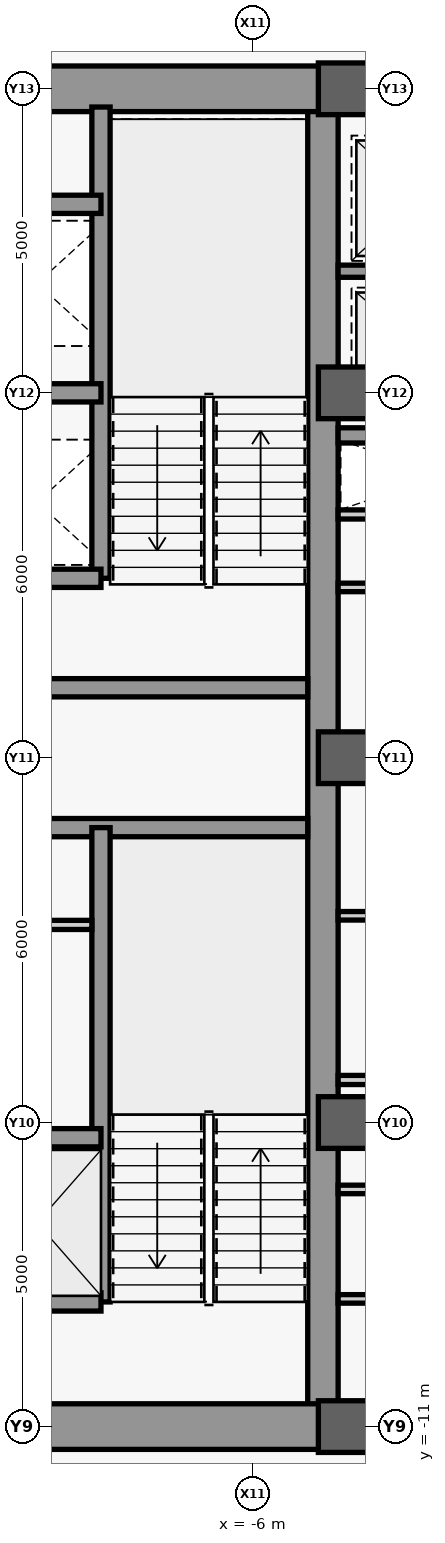
"""IFC4 building model, lengths in metres.
Left out: names, types, materials, properties, quantities, classifications, styles, units other than length and angle.
Written with IfcOpenShell. Run it as: python <this file> out.ifc"""

import sys

from ifc_helpers import new_model, si_unit, direction, frame, frame_2d, origin, origin_2d, place, context, subcontext, project, spatial, rectangle, extrude, source, transform, mapped, element, save


model = new_model("IFC4")
c1 = context("Model", 3, precision=1e-05, world=origin(), true_north=direction((0.0, 1.0)))
c2 = subcontext(c1, "Body", "Model", "MODEL_VIEW")
j1 = project(units=[si_unit("LENGTHUNIT", "METRE"), si_unit("PLANEANGLEUNIT", "RADIAN")], contexts=[c1])
p1 = place(None, origin())
s1 = spatial("IfcSite", under=j1, at=p1, CompositionType="ELEMENT")
p2 = place(p1, origin())
s2 = spatial("IfcBuilding", under=s1, at=p2, CompositionType="ELEMENT")
p3 = place(p2, frame((0.0, 0.0, 155.1)))
s3 = spatial("IfcBuildingStorey", under=s2, at=p3, CompositionType="ELEMENT", Elevation=155.1)
m1 = source(origin(), c2, "Body", "SweptSolid", [
    extrude(rectangle(XDim=21.4, YDim=0.5, at=frame_2d((10.7, 0.0))), origin(), (0.0, 0.0, 1.0), 3.78),
])
p4 = place(p3, frame((-4.85, -10.7, 0.0), z_axis=(0.0, 0.0, 1.0), x_axis=(0.0, 1.0, 0.0)))
e1 = element("IfcWall", 1, at=p4, inside=s3, PredefinedType="SHEAR", context=c2, shape_type="MappedRepresentation", body=[
    mapped(m1, transform((0.0, 0.0, 0.0), scale=1.0)),
])
m2 = source(origin(), c2, "Body", "SweptSolid", [
    extrude(rectangle(XDim=5.85, YDim=0.75, at=frame_2d((2.925, 0.0))), origin(), (0.0, 0.0, 1.0), 3.78),
])
for number, where, z_axis, x_axis in (
    (2, (-10.7, -11.0, 0.0), (0.0, 0.0, 1.0), (1.0, 0.0, 0.0)),
    (3, (-10.7, 11.0, 0.0), (0.0, 0.0, 1.0), (1.0, 0.0, 0.0)),
):
    element("IfcWall", number, at=place(p3, frame(where, z_axis=z_axis, x_axis=x_axis)), inside=s3, PredefinedType="SHEAR", context=c2, shape_type="MappedRepresentation", body=[
        mapped(m2, transform((0.0, 0.0, 0.0), scale=1.0)),
    ])
m3 = source(origin(), c2, "Body", "SweptSolid", [
    extrude(rectangle(XDim=5.6, YDim=0.3, at=frame_2d((2.8, 0.0))), origin(), (0.0, 0.0, 1.0), 3.78),
])
for number, where, z_axis, x_axis in (
    (4, (-10.7, -1.15, 0.0), (0.0, 0.0, 1.0), (1.0, 0.0, 0.0)),
    (5, (-10.7, 1.15, 0.0), (0.0, 0.0, 1.0), (1.0, 0.0, 0.0)),
):
    element("IfcWall", number, at=place(p3, frame(where, z_axis=z_axis, x_axis=x_axis)), inside=s3, PredefinedType="SHEAR", context=c2, shape_type="MappedRepresentation", body=[
        mapped(m3, transform((0.0, 0.0, 0.0), scale=1.0)),
    ])
m4 = source(origin(), c2, "Body", "SweptSolid", [
    extrude(rectangle(XDim=9.2, YDim=0.5, at=frame_2d((4.6, 0.0))), origin(), (0.0, 0.0, 1.0), 3.78),
])
p5 = place(p3, frame((-4.6, -11.0, 0.0), z_axis=(0.0, 0.0, 1.0), x_axis=(1.0, 0.0, 0.0)))
e6 = element("IfcWall", 6, at=p5, inside=s3, PredefinedType="SHEAR", context=c2, shape_type="MappedRepresentation", body=[
    mapped(m4, transform((0.0, 0.0, 0.0), scale=1.0)),
])
m5 = source(origin(), c2, "Body", "SweptSolid", [
    extrude(rectangle(XDim=1.8, YDim=2.25, at=frame_2d((0.9, 1.125))), frame((0.0, 0.26, 0.0), z_axis=(0.0, -1.0, 0.0), x_axis=(1.0, 0.0, 0.0)), (0.0, 0.0, 1.0), 0.52),
])
p6 = place(p5, frame((3.7, 0.0, 0.0)))
e7 = element("IfcOpeningElement", 7, at=p6, cuts=e6, PredefinedType="OPENING", context=c2, shape_type="MappedRepresentation", body=[
    mapped(m5, transform((0.0, 0.0, 0.0), scale=1.0)),
])
p7 = place(p3, frame((-4.6, 11.0, 0.0), z_axis=(0.0, 0.0, 1.0), x_axis=(1.0, 0.0, 0.0)))
e8 = element("IfcWall", 8, at=p7, inside=s3, PredefinedType="SHEAR", context=c2, shape_type="MappedRepresentation", body=[
    mapped(m4, transform((0.0, 0.0, 0.0), scale=1.0)),
])
p8 = place(p7, frame((3.7, 0.0, 0.0)))
e9 = element("IfcOpeningElement", 9, at=p8, cuts=e8, PredefinedType="OPENING", context=c2, shape_type="MappedRepresentation", body=[
    mapped(m5, transform((0.0, 0.0, 0.0), scale=1.0)),
])
m6 = source(origin(), c2, "Body", "SweptSolid", [
    extrude(rectangle(XDim=0.85, YDim=0.85, at=origin_2d()), origin(), (0.0, 0.0, 1.0), 4.0),
])
for number, where, z_axis, x_axis in (
    (10, (-4.5, -11.0, 0.0), (0.0, 0.0, 1.0), (1.0, 0.0, 0.0)),
    (11, (-4.5, -6.0, 0.0), (0.0, 0.0, 1.0), (1.0, 0.0, 0.0)),
    (12, (-4.5, 0.0, 0.0), (0.0, 0.0, 1.0), (1.0, 0.0, 0.0)),
    (13, (-4.5, 6.0, 0.0), (0.0, 0.0, 1.0), (1.0, 0.0, 0.0)),
    (14, (-4.5, 11.0, 0.0), (0.0, 0.0, 1.0), (1.0, 0.0, 0.0)),
):
    element("IfcColumn", number, at=place(p3, frame(where, z_axis=z_axis, x_axis=x_axis)), inside=s3, PredefinedType="COLUMN", context=c2, shape_type="MappedRepresentation", body=[
        mapped(m6, transform((0.0, 0.0, 0.0), scale=1.0)),
    ])
m7 = source(origin(), c2, "Body", "SweptSolid", [
    extrude(rectangle(XDim=7.8, YDim=0.3, at=frame_2d((3.9, 0.0))), origin(), (0.0, 0.0, 1.0), 3.78),
])
p9 = place(p3, frame((-8.5, -8.95, 0.0), z_axis=(0.0, 0.0, 1.0), x_axis=(0.0, 1.0, 0.0)))
e15 = element("IfcWall", 15, at=p9, inside=s3, PredefinedType="SHEAR", context=c2, shape_type="MappedRepresentation", body=[
    mapped(m7, transform((0.0, 0.0, 0.0), scale=1.0)),
])
m8 = source(origin(), c2, "Body", "SweptSolid", [
    extrude(rectangle(XDim=2.2, YDim=0.3, at=frame_2d((1.1, 0.0))), origin(), (0.0, 0.0, 1.0), 3.78),
])
for number, where, z_axis, x_axis in (
    (16, (-10.7, -8.95, 0.0), (0.0, 0.0, 1.0), (1.0, 0.0, 0.0)),
    (17, (-10.7, -6.25, 0.0), (0.0, 0.0, 1.0), (1.0, 0.0, 0.0)),
):
    element("IfcWall", number, at=place(p3, frame(where, z_axis=z_axis, x_axis=x_axis)), inside=s3, PredefinedType="SHEAR", context=c2, shape_type="MappedRepresentation", body=[
        mapped(m8, transform((0.0, 0.0, 0.0), scale=1.0)),
    ])
m9 = source(origin(), c2, "Body", "SweptSolid", [
    extrude(rectangle(XDim=7.75, YDim=0.3, at=frame_2d((3.875, 0.0))), origin(), (0.0, 0.0, 1.0), 3.78),
])
p10 = place(p3, frame((-8.5, 2.95, 0.0), z_axis=(0.0, 0.0, 1.0), x_axis=(0.0, 1.0, 0.0)))
e18 = element("IfcWall", 18, at=p10, inside=s3, PredefinedType="SHEAR", context=c2, shape_type="MappedRepresentation", body=[
    mapped(m9, transform((0.0, 0.0, 0.0), scale=1.0)),
])
for number, where, z_axis, x_axis in (
    (19, (-10.7, 2.95, 0.0), (0.0, 0.0, 1.0), (1.0, 0.0, 0.0)),
    (20, (-10.7, 6.0, 0.0), (0.0, 0.0, 1.0), (1.0, 0.0, 0.0)),
    (21, (-10.7, 9.1, 0.0), (0.0, 0.0, 1.0), (1.0, 0.0, 0.0)),
):
    element("IfcWall", number, at=place(p3, frame(where, z_axis=z_axis, x_axis=x_axis)), inside=s3, PredefinedType="SHEAR", context=c2, shape_type="MappedRepresentation", body=[
        mapped(m8, transform((0.0, 0.0, 0.0), scale=1.0)),
    ])
m10 = source(origin(), c2, "Body", "SweptSolid", [
    extrude(rectangle(XDim=2.05, YDim=0.15, at=frame_2d((1.025, 0.0))), origin(), (0.0, 0.0, 1.0), 3.78),
])
p11 = place(p3, frame((-10.7, -2.75, 0.0), z_axis=(0.0, 0.0, 1.0), x_axis=(1.0, 0.0, 0.0)))
e22 = element("IfcWall", 22, at=p11, inside=s3, PredefinedType="PARTITIONING", context=c2, shape_type="MappedRepresentation", body=[
    mapped(m10, transform((0.0, 0.0, 0.0), scale=1.0)),
])
m11 = source(origin(), c2, "Body", "SweptSolid", [
    extrude(rectangle(XDim=3.45, YDim=0.15, at=frame_2d((1.725, 0.0))), origin(), (0.0, 0.0, 1.0), 3.78),
])
p12 = place(p3, frame((-4.6, 4.0, 0.0), z_axis=(0.0, 0.0, 1.0), x_axis=(1.0, 0.0, 0.0)))
e23 = element("IfcWall", 23, at=p12, inside=s3, PredefinedType="PARTITIONING", context=c2, shape_type="MappedRepresentation", body=[
    mapped(m11, transform((0.0, 0.0, 0.0), scale=1.0)),
])
m12 = source(origin(), c2, "Body", "SweptSolid", [
    extrude(rectangle(XDim=3.45, YDim=0.14, at=frame_2d((1.725, 0.0))), origin(), (0.0, 0.0, 1.0), 3.78),
])
for number, where, z_axis, x_axis in (
    (24, (-4.6, -8.9, 0.0), (0.0, 0.0, 1.0), (1.0, 0.0, 0.0)),
    (25, (-4.6, -7.1, 0.0), (0.0, 0.0, 1.0), (1.0, 0.0, 0.0)),
):
    element("IfcWall", number, at=place(p3, frame(where, z_axis=z_axis, x_axis=x_axis)), inside=s3, PredefinedType="PARTITIONING", context=c2, shape_type="MappedRepresentation", body=[
        mapped(m12, transform((0.0, 0.0, 0.0), scale=1.0)),
    ])
p13 = place(p3, frame((-4.6, -5.3, 0.0), z_axis=(0.0, 0.0, 1.0), x_axis=(1.0, 0.0, 0.0)))
e26 = element("IfcWall", 26, at=p13, inside=s3, PredefinedType="PARTITIONING", context=c2, shape_type="MappedRepresentation", body=[
    mapped(m11, transform((0.0, 0.0, 0.0), scale=1.0)),
])
m13 = source(origin(), c2, "Body", "SweptSolid", [
    extrude(rectangle(XDim=2.45, YDim=0.2, at=frame_2d((1.225, 0.0))), origin(), (0.0, 0.0, 1.0), 3.78),
])
p14 = place(p3, frame((-4.6, 8.0, 0.0), z_axis=(0.0, 0.0, 1.0), x_axis=(1.0, 0.0, 0.0)))
e27 = element("IfcWall", 27, at=p14, inside=s3, PredefinedType="SHEAR", context=c2, shape_type="MappedRepresentation", body=[
    mapped(m13, transform((0.0, 0.0, 0.0), scale=1.0)),
])
m14 = source(origin(), c2, "Body", "SweptSolid", [
    extrude(rectangle(XDim=9.2, YDim=0.25, at=frame_2d((4.6, 0.0))), origin(), (0.0, 0.0, 1.0), 3.78),
])
p15 = place(p3, frame((-4.6, 5.3, 0.0), z_axis=(0.0, 0.0, 1.0), x_axis=(1.0, 0.0, 0.0)))
e28 = element("IfcWall", 28, at=p15, inside=s3, PredefinedType="SHEAR", context=c2, shape_type="MappedRepresentation", body=[
    mapped(m14, transform((0.0, 0.0, 0.0), scale=1.0)),
])
m15 = source(origin(), c2, "Body", "SweptSolid", [
    extrude(rectangle(XDim=1.05, YDim=2.2, at=frame_2d((0.525, 1.1))), frame((0.0, 0.135, 0.0), z_axis=(0.0, -1.0, 0.0), x_axis=(1.0, 0.0, 0.0)), (0.0, 0.0, 1.0), 0.27),
])
p16 = place(p15, frame((4.075, 0.0, 0.0)))
e29 = element("IfcOpeningElement", 29, at=p16, cuts=e28, PredefinedType="OPENING", context=c2, shape_type="MappedRepresentation", body=[
    mapped(m15, transform((0.0, 0.0, 0.0), scale=1.0)),
])
p17 = place(p3, frame((-4.6, -2.6, 0.0), z_axis=(0.0, 0.0, 1.0), x_axis=(1.0, 0.0, 0.0)))
e30 = element("IfcWall", 30, at=p17, inside=s3, PredefinedType="PARTITIONING", context=c2, shape_type="MappedRepresentation", body=[
    mapped(m12, transform((0.0, 0.0, 0.0), scale=1.0)),
])
m16 = source(origin(), c2, "Body", "SweptSolid", [
    extrude(rectangle(XDim=3.45, YDim=0.14, at=frame_2d((1.725, 0.0))), origin(), (0.0, 0.0, 1.0), 3.085),
])
p18 = place(p3, frame((-4.6, 0.2, 0.0), z_axis=(0.0, 0.0, 1.0), x_axis=(1.0, 0.0, 0.0)))
e31 = element("IfcWall", 31, at=p18, inside=s3, PredefinedType="PARTITIONING", context=c2, shape_type="MappedRepresentation", body=[
    mapped(m16, transform((0.0, 0.0, 0.0), scale=1.0)),
])
p19 = place(p3, frame((-4.6, 2.8, 0.0), z_axis=(0.0, 0.0, 1.0), x_axis=(1.0, 0.0, 0.0)))
e32 = element("IfcWall", 32, at=p19, inside=s3, PredefinedType="PARTITIONING", context=c2, shape_type="MappedRepresentation", body=[
    mapped(m12, transform((0.0, 0.0, 0.0), scale=1.0)),
])
save(model, sys.argv[1])
